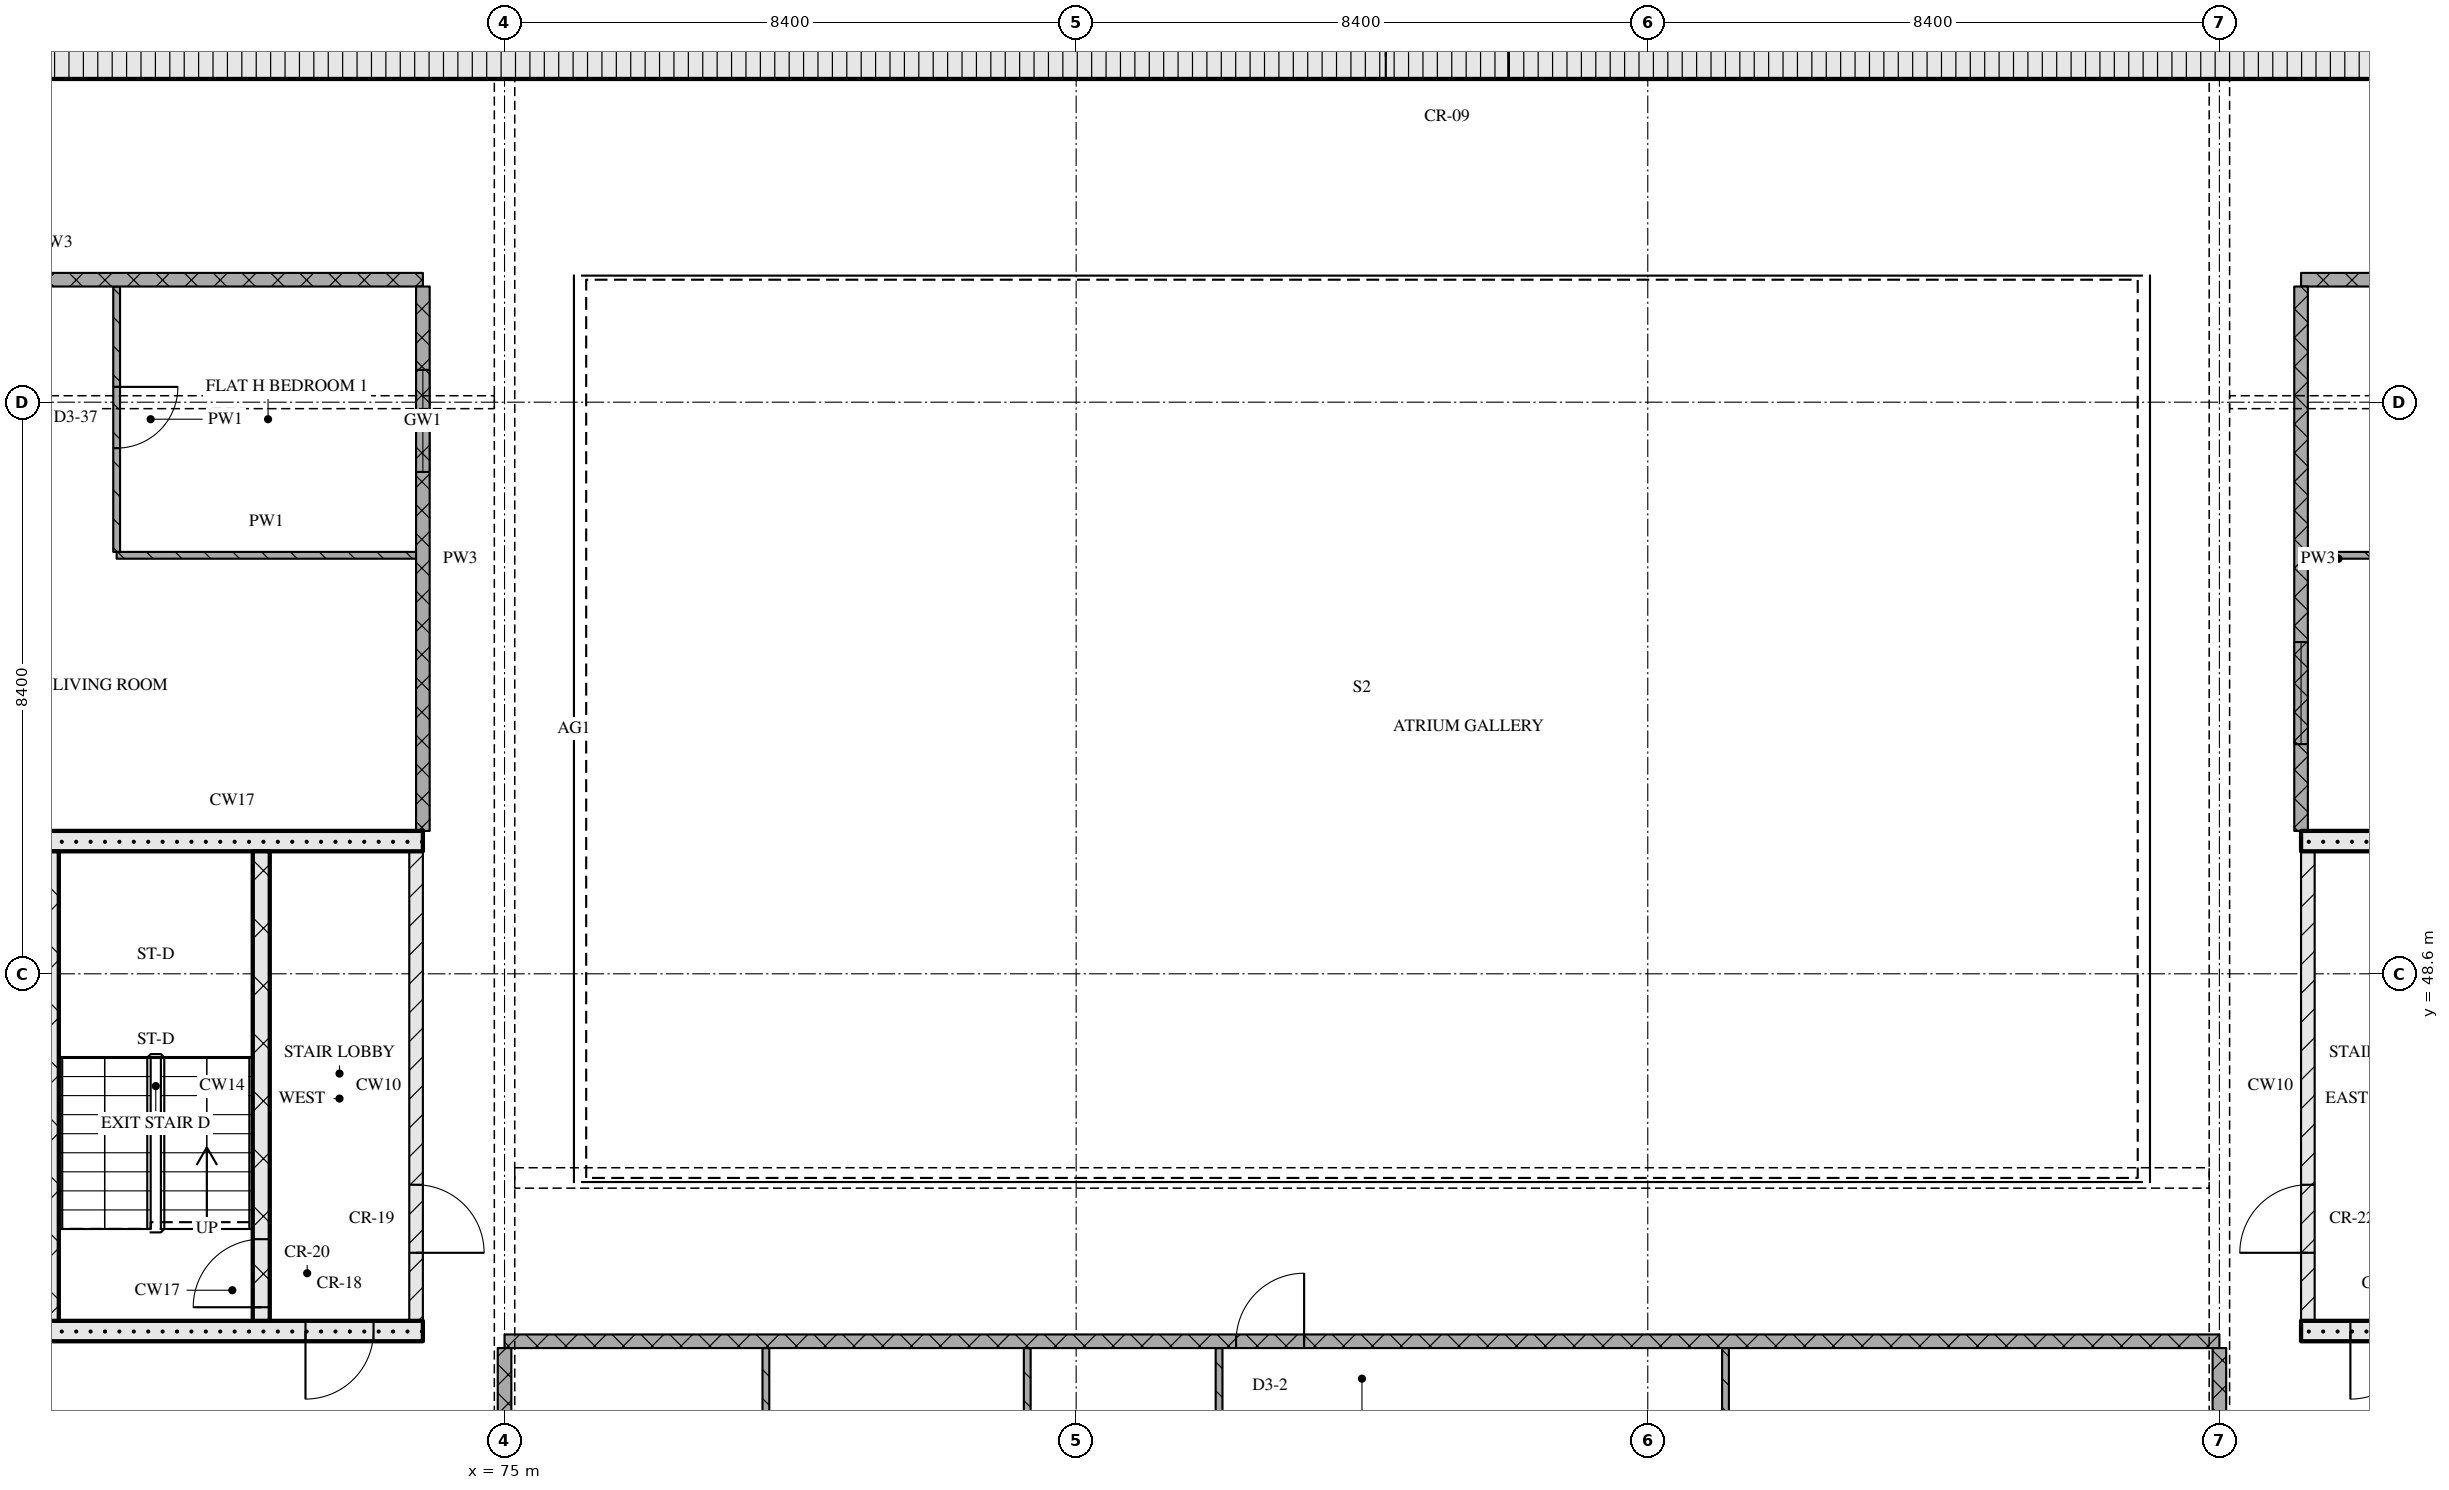
"""IFC4 building model, lengths in metres.
Left out: names, types, materials, properties, quantities, classifications, styles, units other than length and angle.
Written with IfcOpenShell. Run it as: python <this file> out.ifc"""

import sys

from ifc_helpers import new_model, si_unit, direction, frame, frame_2d, origin, place, context, subcontext, project, spatial, rectangle, extrude, element, fill, save


model = new_model("IFC4")
c1 = context("Model", 3, precision=1e-05, world=origin(), true_north=direction((0.0, 1.0)))
c2 = subcontext(c1, "Body", "Model", "MODEL_VIEW")
j1 = project(units=[si_unit("LENGTHUNIT", "METRE"), si_unit("PLANEANGLEUNIT", "RADIAN")], contexts=[c1])
p1 = place(None, origin())
s1 = spatial("IfcSite", under=j1, at=p1, CompositionType="ELEMENT")
p2 = place(p1, origin())
s2 = spatial("IfcBuilding", under=s1, at=p2, CompositionType="ELEMENT")
p3 = place(p2, frame((0.0, 0.0, 234.3)))
s3 = spatial("IfcBuildingStorey", under=s2, at=p3, CompositionType="ELEMENT", Elevation=234.3)
p4 = place(p3, frame((67.15, 62.075, 0.0), z_axis=(0.0, 0.0, 1.0), x_axis=(1.0, 0.0, 0.0)))
e1 = element("IfcWall", 1, at=p4, inside=s3, PredefinedType="SOLIDWALL", context=c2, shape_type="SweptSolid", body=[
    extrude(rectangle(XDim=40.9, YDim=0.65, at=frame_2d((20.45, 0.0))), origin(), (0.0, 0.0, 1.0), 3.32),
])
p5 = place(p4, frame((20.8, 0.0, 0.0)))
e2 = element("IfcOpeningElement", 2, at=p5, cuts=e1, PredefinedType="OPENING", context=c2, shape_type="SweptSolid", body=[
    extrude(rectangle(XDim=1.8, YDim=2.1, at=frame_2d((0.9, 1.05))), frame((0.0, 0.335, 0.0), z_axis=(0.0, -1.0, 0.0), x_axis=(1.0, 0.0, 0.0)), (0.0, 0.0, 1.0), 0.67),
])
p6 = place(p3, frame((68.2, 43.35, 0.0), z_axis=(0.0, 0.0, 1.0), x_axis=(1.0, 0.0, 0.0)))
e3 = element("IfcWall", 3, at=p6, inside=s3, PredefinedType="SOLIDWALL", context=c2, shape_type="SweptSolid", body=[
    extrude(rectangle(XDim=5.6, YDim=0.3, at=frame_2d((2.8, 0.0))), origin(), (0.0, 0.0, 1.0), 3.32),
])
p7 = place(p6, frame((3.875, 0.0, 0.0)))
e4 = element("IfcOpeningElement", 4, at=p7, cuts=e3, PredefinedType="OPENING", context=c2, shape_type="SweptSolid", body=[
    extrude(rectangle(XDim=1.0, YDim=2.1, at=frame_2d((0.5, 1.05))), frame((0.0, 0.16, 0.0), z_axis=(0.0, -1.0, 0.0), x_axis=(1.0, 0.0, 0.0)), (0.0, 0.0, 1.0), 0.32),
])
p8 = place(p3, frame((68.325, 43.5, 0.0), z_axis=(0.0, 0.0, 1.0), x_axis=(0.0, 1.0, 0.0)))
e5 = element("IfcWall", 5, at=p8, inside=s3, PredefinedType="SOLIDWALL", context=c2, shape_type="SweptSolid", body=[
    extrude(rectangle(XDim=6.9, YDim=0.25, at=frame_2d((3.45, 0.0))), origin(), (0.0, 0.0, 1.0), 3.32),
])
p9 = place(p3, frame((71.425, 43.5, 0.0), z_axis=(0.0, 0.0, 1.0), x_axis=(0.0, 1.0, 0.0)))
e6 = element("IfcWall", 6, at=p9, inside=s3, PredefinedType="SOLIDWALL", context=c2, shape_type="SweptSolid", body=[
    extrude(rectangle(XDim=6.9, YDim=0.25, at=frame_2d((3.45, 0.0))), origin(), (0.0, 0.0, 1.0), 3.32),
])
p10 = place(p9, frame((0.2, 0.0, 0.0)))
e7 = element("IfcOpeningElement", 7, at=p10, cuts=e6, PredefinedType="OPENING", context=c2, shape_type="SweptSolid", body=[
    extrude(rectangle(XDim=1.0, YDim=2.1, at=frame_2d((0.5, 1.05))), frame((0.0, 0.135, 0.0), z_axis=(0.0, -1.0, 0.0), x_axis=(1.0, 0.0, 0.0)), (0.0, 0.0, 1.0), 0.27),
])
p11 = place(p3, frame((73.7, 43.5, 0.0), z_axis=(0.0, 0.0, 1.0), x_axis=(0.0, 1.0, 0.0)))
e8 = element("IfcWall", 8, at=p11, inside=s3, PredefinedType="PARTITIONING", context=c2, shape_type="SweptSolid", body=[
    extrude(rectangle(XDim=6.9, YDim=0.2, at=frame_2d((3.45, 0.0))), origin(), (0.0, 0.0, 1.0), 3.32),
])
p12 = place(p11, frame((1.0, 0.0, 0.0)))
e9 = element("IfcOpeningElement", 9, at=p12, cuts=e8, PredefinedType="OPENING", context=c2, shape_type="SweptSolid", body=[
    extrude(rectangle(XDim=1.0, YDim=2.1, at=frame_2d((0.5, 1.05))), frame((0.0, 0.11, 0.0), z_axis=(0.0, -1.0, 0.0), x_axis=(1.0, 0.0, 0.0)), (0.0, 0.0, 1.0), 0.22),
])
p13 = place(p3, frame((68.2, 50.55, 0.0), z_axis=(0.0, 0.0, 1.0), x_axis=(1.0, 0.0, 0.0)))
e10 = element("IfcWall", 10, at=p13, inside=s3, PredefinedType="SOLIDWALL", context=c2, shape_type="SweptSolid", body=[
    extrude(rectangle(XDim=5.6, YDim=0.3, at=frame_2d((2.8, 0.0))), origin(), (0.0, 0.0, 1.0), 3.32),
])
p14 = place(p3, frame((101.4, 43.35, 0.0), z_axis=(0.0, 0.0, 1.0), x_axis=(1.0, 0.0, 0.0)))
e11 = element("IfcWall", 11, at=p14, inside=s3, PredefinedType="SOLIDWALL", context=c2, shape_type="SweptSolid", body=[
    extrude(rectangle(XDim=5.6, YDim=0.3, at=frame_2d((2.8, 0.0))), origin(), (0.0, 0.0, 1.0), 3.32),
])
p15 = place(p14, frame((0.725, 0.0, 0.0)))
e12 = element("IfcOpeningElement", 12, at=p15, cuts=e11, PredefinedType="OPENING", context=c2, shape_type="SweptSolid", body=[
    extrude(rectangle(XDim=1.0, YDim=2.1, at=frame_2d((0.5, 1.05))), frame((0.0, 0.16, 0.0), z_axis=(0.0, -1.0, 0.0), x_axis=(1.0, 0.0, 0.0)), (0.0, 0.0, 1.0), 0.32),
])
p16 = place(p3, frame((101.5, 43.5, 0.0), z_axis=(0.0, 0.0, 1.0), x_axis=(0.0, 1.0, 0.0)))
e13 = element("IfcWall", 13, at=p16, inside=s3, PredefinedType="PARTITIONING", context=c2, shape_type="SweptSolid", body=[
    extrude(rectangle(XDim=6.9, YDim=0.2, at=frame_2d((3.45, 0.0))), origin(), (0.0, 0.0, 1.0), 3.32),
])
p17 = place(p16, frame((1.0, 0.0, 0.0)))
e14 = element("IfcOpeningElement", 14, at=p17, cuts=e13, PredefinedType="OPENING", context=c2, shape_type="SweptSolid", body=[
    extrude(rectangle(XDim=1.0, YDim=2.1, at=frame_2d((0.5, 1.05))), frame((0.0, 0.11, 0.0), z_axis=(0.0, -1.0, 0.0), x_axis=(1.0, 0.0, 0.0)), (0.0, 0.0, 1.0), 0.22),
])
p18 = place(p3, frame((101.4, 50.55, 0.0), z_axis=(0.0, 0.0, 1.0), x_axis=(1.0, 0.0, 0.0)))
e15 = element("IfcWall", 15, at=p18, inside=s3, PredefinedType="SOLIDWALL", context=c2, shape_type="SweptSolid", body=[
    extrude(rectangle(XDim=5.6, YDim=0.3, at=frame_2d((2.8, 0.0))), origin(), (0.0, 0.0, 1.0), 3.32),
])
p19 = place(p3, frame((100.2, 43.2, 0.0), z_axis=(0.0, 0.0, 1.0), x_axis=(-1.0, 0.0, 0.0)))
e16 = element("IfcWall", 16, at=p19, inside=s3, PredefinedType="PARTITIONING", context=c2, shape_type="SweptSolid", body=[
    extrude(rectangle(XDim=25.2, YDim=0.2, at=frame_2d((12.6, 0.0))), origin(), (0.0, 0.0, 1.0), 3.32),
])
p20 = place(p19, frame((13.45, 0.0, 0.0)))
e17 = element("IfcOpeningElement", 17, at=p20, cuts=e16, PredefinedType="OPENING", context=c2, shape_type="SweptSolid", body=[
    extrude(rectangle(XDim=1.0, YDim=2.1, at=frame_2d((0.5, 1.05))), frame((0.0, 0.11, 0.0), z_axis=(0.0, -1.0, 0.0), x_axis=(1.0, 0.0, 0.0)), (0.0, 0.0, 1.0), 0.22),
])
p21 = place(p3, frame((69.3, 54.75, 0.0), z_axis=(0.0, 0.0, 1.0), x_axis=(1.0, 0.0, 0.0)))
e18 = element("IfcWall", 18, at=p21, inside=s3, PredefinedType="PARTITIONING", context=c2, shape_type="SweptSolid", body=[
    extrude(rectangle(XDim=4.4, YDim=0.1, at=frame_2d((2.2, 0.0))), origin(), (0.0, 0.0, 1.0), 3.32),
])
p22 = place(p3, frame((105.9, 54.75, 0.0), z_axis=(0.0, 0.0, 1.0), x_axis=(-1.0, 0.0, 0.0)))
e19 = element("IfcWall", 19, at=p22, inside=s3, PredefinedType="PARTITIONING", context=c2, shape_type="SweptSolid", body=[
    extrude(rectangle(XDim=4.4, YDim=0.1, at=frame_2d((2.2, 0.0))), origin(), (0.0, 0.0, 1.0), 3.32),
])
p23 = place(p22, frame((1.8, 0.0, 0.0)))
e20 = element("IfcOpeningElement", 20, at=p23, cuts=e19, PredefinedType="OPENING", context=c2, shape_type="SweptSolid", body=[
    extrude(rectangle(XDim=0.9, YDim=2.1, at=frame_2d((0.45, 1.05))), frame((0.0, 0.06, 0.0), z_axis=(0.0, -1.0, 0.0), x_axis=(1.0, 0.0, 0.0)), (0.0, 0.0, 1.0), 0.12),
])
p24 = place(p3, frame((63.0, 58.8, 0.0), z_axis=(0.0, 0.0, 1.0), x_axis=(1.0, 0.0, 0.0)))
e21 = element("IfcWall", 21, at=p24, inside=s3, PredefinedType="PARTITIONING", context=c2, shape_type="SweptSolid", body=[
    extrude(rectangle(XDim=10.8, YDim=0.2, at=frame_2d((5.4, 0.0))), origin(), (0.0, 0.0, 1.0), 3.32),
])
p25 = place(p3, frame((112.2, 58.8, 0.0), z_axis=(0.0, 0.0, 1.0), x_axis=(-1.0, 0.0, 0.0)))
e22 = element("IfcWall", 22, at=p25, inside=s3, PredefinedType="PARTITIONING", context=c2, shape_type="SweptSolid", body=[
    extrude(rectangle(XDim=10.8, YDim=0.2, at=frame_2d((5.4, 0.0))), origin(), (0.0, 0.0, 1.0), 3.32),
])
p26 = place(p25, frame((6.45, 0.0, 0.0)))
e23 = element("IfcOpeningElement", 23, at=p26, cuts=e22, PredefinedType="OPENING", context=c2, shape_type="SweptSolid", body=[
    extrude(rectangle(XDim=1.0, YDim=2.1, at=frame_2d((0.5, 1.05))), frame((0.0, 0.11, 0.0), z_axis=(0.0, -1.0, 0.0), x_axis=(1.0, 0.0, 0.0)), (0.0, 0.0, 1.0), 0.22),
])
p27 = place(p3, frame((69.3, 58.7, 0.0), z_axis=(0.0, 0.0, 1.0), x_axis=(0.0, -1.0, 0.0)))
e24 = element("IfcWall", 24, at=p27, inside=s3, PredefinedType="PARTITIONING", context=c2, shape_type="SweptSolid", body=[
    extrude(rectangle(XDim=3.9, YDim=0.1, at=frame_2d((1.95, 0.0))), origin(), (0.0, 0.0, 1.0), 3.32),
])
p28 = place(p27, frame((1.475, 0.0, 0.0)))
e25 = element("IfcOpeningElement", 25, at=p28, cuts=e24, PredefinedType="OPENING", context=c2, shape_type="SweptSolid", body=[
    extrude(rectangle(XDim=0.9, YDim=2.1, at=frame_2d((0.45, 1.05))), frame((0.0, 0.06, 0.0), z_axis=(0.0, -1.0, 0.0), x_axis=(1.0, 0.0, 0.0)), (0.0, 0.0, 1.0), 0.12),
])
p29 = place(p3, frame((73.8, 58.7, 0.0), z_axis=(0.0, 0.0, 1.0), x_axis=(0.0, -1.0, 0.0)))
e26 = element("IfcWall", 26, at=p29, inside=s3, PredefinedType="PARTITIONING", context=c2, shape_type="SweptSolid", body=[
    extrude(rectangle(XDim=8.0, YDim=0.2, at=frame_2d((4.0, 0.0))), origin(), (0.0, 0.0, 1.0), 3.32),
])
p30 = place(p29, frame((1.225, 0.0, 0.9)))
e27 = element("IfcOpeningElement", 27, at=p30, cuts=e26, PredefinedType="OPENING", context=c2, shape_type="SweptSolid", body=[
    extrude(rectangle(XDim=1.5, YDim=1.5, at=frame_2d((0.75, 0.75))), frame((0.0, 0.11, 0.0), z_axis=(0.0, -1.0, 0.0), x_axis=(1.0, 0.0, 0.0)), (0.0, 0.0, 1.0), 0.22),
])
p31 = place(p3, frame((75.0, 43.1, 0.0), z_axis=(0.0, 0.0, 1.0), x_axis=(0.0, -1.0, 0.0)))
e28 = element("IfcWall", 28, at=p31, inside=s3, PredefinedType="PARTITIONING", context=c2, shape_type="SweptSolid", body=[
    extrude(rectangle(XDim=2.2, YDim=0.2, at=frame_2d((1.1, 0.0))), origin(), (0.0, 0.0, 1.0), 2.53),
])
for number, where, z_axis, x_axis in (
    (29, (78.841, 43.1, 0.0), (0.0, 0.0, 1.0), (0.0, -1.0, 0.0)),
    (30, (82.681, 43.1, 0.0), (0.0, 0.0, 1.0), (0.0, -1.0, 0.0)),
    (31, (85.5, 43.1, 0.0), (0.0, 0.0, 1.0), (0.0, -1.0, 0.0)),
    (32, (92.942, 43.1, 0.0), (0.0, 0.0, 1.0), (0.0, -1.0, 0.0)),
):
    element("IfcWall", number, at=place(p3, frame(where, z_axis=z_axis, x_axis=x_axis)), inside=s3, PredefinedType="PARTITIONING", context=c2, shape_type="SweptSolid", body=[
        extrude(rectangle(XDim=6.75, YDim=0.1, at=frame_2d((3.375, 0.0))), origin(), (0.0, 0.0, 1.0), 3.32),
    ])
p32 = place(p3, frame((100.2, 43.1, 0.0), z_axis=(0.0, 0.0, 1.0), x_axis=(0.0, -1.0, 0.0)))
e33 = element("IfcWall", 33, at=p32, inside=s3, PredefinedType="PARTITIONING", context=c2, shape_type="SweptSolid", body=[
    extrude(rectangle(XDim=2.2, YDim=0.2, at=frame_2d((1.1, 0.0))), origin(), (0.0, 0.0, 1.0), 2.53),
])
p33 = place(p3, frame((101.4, 58.7, 0.0), z_axis=(0.0, 0.0, 1.0), x_axis=(0.0, -1.0, 0.0)))
e34 = element("IfcWall", 34, at=p33, inside=s3, PredefinedType="PARTITIONING", context=c2, shape_type="SweptSolid", body=[
    extrude(rectangle(XDim=8.0, YDim=0.2, at=frame_2d((4.0, 0.0))), origin(), (0.0, 0.0, 1.0), 3.32),
])
p34 = place(p33, frame((5.225, 0.0, 0.9)))
e35 = element("IfcOpeningElement", 35, at=p34, cuts=e34, PredefinedType="OPENING", context=c2, shape_type="SweptSolid", body=[
    extrude(rectangle(XDim=1.5, YDim=1.5, at=frame_2d((0.75, 0.75))), frame((0.0, 0.11, 0.0), z_axis=(0.0, -1.0, 0.0), x_axis=(1.0, 0.0, 0.0)), (0.0, 0.0, 1.0), 0.22),
])
p35 = place(p5, origin())
e36 = element("IfcDoor", 36, at=p35, inside=s3, OperationType="DOUBLE_DOOR_SINGLE_SWING", PredefinedType="DOOR", context=c2, shape_type="SweptSolid", body=[
    extrude(rectangle(XDim=1.8, YDim=2.1, at=frame_2d((0.9, 1.05))), frame((0.0, 0.025, 0.0), z_axis=(0.0, -1.0, 0.0), x_axis=(1.0, 0.0, 0.0)), (0.0, 0.0, 1.0), 0.05),
])
fill(e2, e36)
p36 = place(p7, origin())
e37 = element("IfcDoor", 37, at=p36, inside=s3, OperationType="SINGLE_SWING_RIGHT", PredefinedType="DOOR", context=c2, shape_type="SweptSolid", body=[
    extrude(rectangle(XDim=1.0, YDim=2.1, at=frame_2d((0.5, 1.05))), frame((0.0, 0.025, 0.0), z_axis=(0.0, -1.0, 0.0), x_axis=(1.0, 0.0, 0.0)), (0.0, 0.0, 1.0), 0.05),
])
fill(e4, e37)
p37 = place(p10, origin())
e38 = element("IfcDoor", 38, at=p37, inside=s3, OperationType="SINGLE_SWING_LEFT", PredefinedType="DOOR", context=c2, shape_type="SweptSolid", body=[
    extrude(rectangle(XDim=1.0, YDim=2.1, at=frame_2d((0.5, 1.05))), frame((0.0, 0.025, 0.0), z_axis=(0.0, -1.0, 0.0), x_axis=(1.0, 0.0, 0.0)), (0.0, 0.0, 1.0), 0.05),
])
fill(e7, e38)
p38 = place(p12, origin())
e39 = element("IfcDoor", 39, at=p38, inside=s3, OperationType="SINGLE_SWING_RIGHT", PredefinedType="DOOR", context=c2, shape_type="SweptSolid", body=[
    extrude(rectangle(XDim=1.0, YDim=2.1, at=frame_2d((0.5, 1.05))), frame((0.0, 0.025, 0.0), z_axis=(0.0, -1.0, 0.0), x_axis=(1.0, 0.0, 0.0)), (0.0, 0.0, 1.0), 0.05),
])
fill(e9, e39)
p39 = place(p15, origin())
e40 = element("IfcDoor", 40, at=p39, inside=s3, OperationType="SINGLE_SWING_RIGHT", PredefinedType="DOOR", context=c2, shape_type="SweptSolid", body=[
    extrude(rectangle(XDim=1.0, YDim=2.1, at=frame_2d((0.5, 1.05))), frame((0.0, 0.025, 0.0), z_axis=(0.0, -1.0, 0.0), x_axis=(1.0, 0.0, 0.0)), (0.0, 0.0, 1.0), 0.05),
])
fill(e12, e40)
p40 = place(p17, origin())
e41 = element("IfcDoor", 41, at=p40, inside=s3, OperationType="SINGLE_SWING_LEFT", PredefinedType="DOOR", context=c2, shape_type="SweptSolid", body=[
    extrude(rectangle(XDim=1.0, YDim=2.1, at=frame_2d((0.5, 1.05))), frame((0.0, 0.025, 0.0), z_axis=(0.0, -1.0, 0.0), x_axis=(1.0, 0.0, 0.0)), (0.0, 0.0, 1.0), 0.05),
])
fill(e14, e41)
p41 = place(p20, origin())
e42 = element("IfcDoor", 42, at=p41, inside=s3, OperationType="SINGLE_SWING_RIGHT", PredefinedType="DOOR", context=c2, shape_type="SweptSolid", body=[
    extrude(rectangle(XDim=1.0, YDim=2.1, at=frame_2d((0.5, 1.05))), frame((0.0, 0.025, 0.0), z_axis=(0.0, -1.0, 0.0), x_axis=(1.0, 0.0, 0.0)), (0.0, 0.0, 1.0), 0.05),
])
fill(e17, e42)
p42 = place(p28, origin())
e43 = element("IfcDoor", 43, at=p42, inside=s3, OperationType="SINGLE_SWING_LEFT", PredefinedType="DOOR", context=c2, shape_type="SweptSolid", body=[
    extrude(rectangle(XDim=0.9, YDim=2.1, at=frame_2d((0.45, 1.05))), frame((0.0, 0.025, 0.0), z_axis=(0.0, -1.0, 0.0), x_axis=(1.0, 0.0, 0.0)), (0.0, 0.0, 1.0), 0.05),
])
fill(e25, e43)
p43 = place(p30, origin())
e44 = element("IfcWindow", 44, at=p43, inside=s3, PartitioningType="SINGLE_PANEL", PredefinedType="WINDOW", context=c2, shape_type="SweptSolid", body=[
    extrude(rectangle(XDim=1.5, YDim=1.5, at=frame_2d((0.75, 0.75))), frame((0.0, 0.03, 0.0), z_axis=(0.0, -1.0, 0.0), x_axis=(1.0, 0.0, 0.0)), (0.0, 0.0, 1.0), 0.06),
])
fill(e27, e44)
p44 = place(p34, origin())
e45 = element("IfcWindow", 45, at=p44, inside=s3, PartitioningType="SINGLE_PANEL", PredefinedType="WINDOW", context=c2, shape_type="SweptSolid", body=[
    extrude(rectangle(XDim=1.5, YDim=1.5, at=frame_2d((0.75, 0.75))), frame((0.0, 0.03, 0.0), z_axis=(0.0, -1.0, 0.0), x_axis=(1.0, 0.0, 0.0)), (0.0, 0.0, 1.0), 0.06),
])
fill(e35, e45)
save(model, sys.argv[1])
